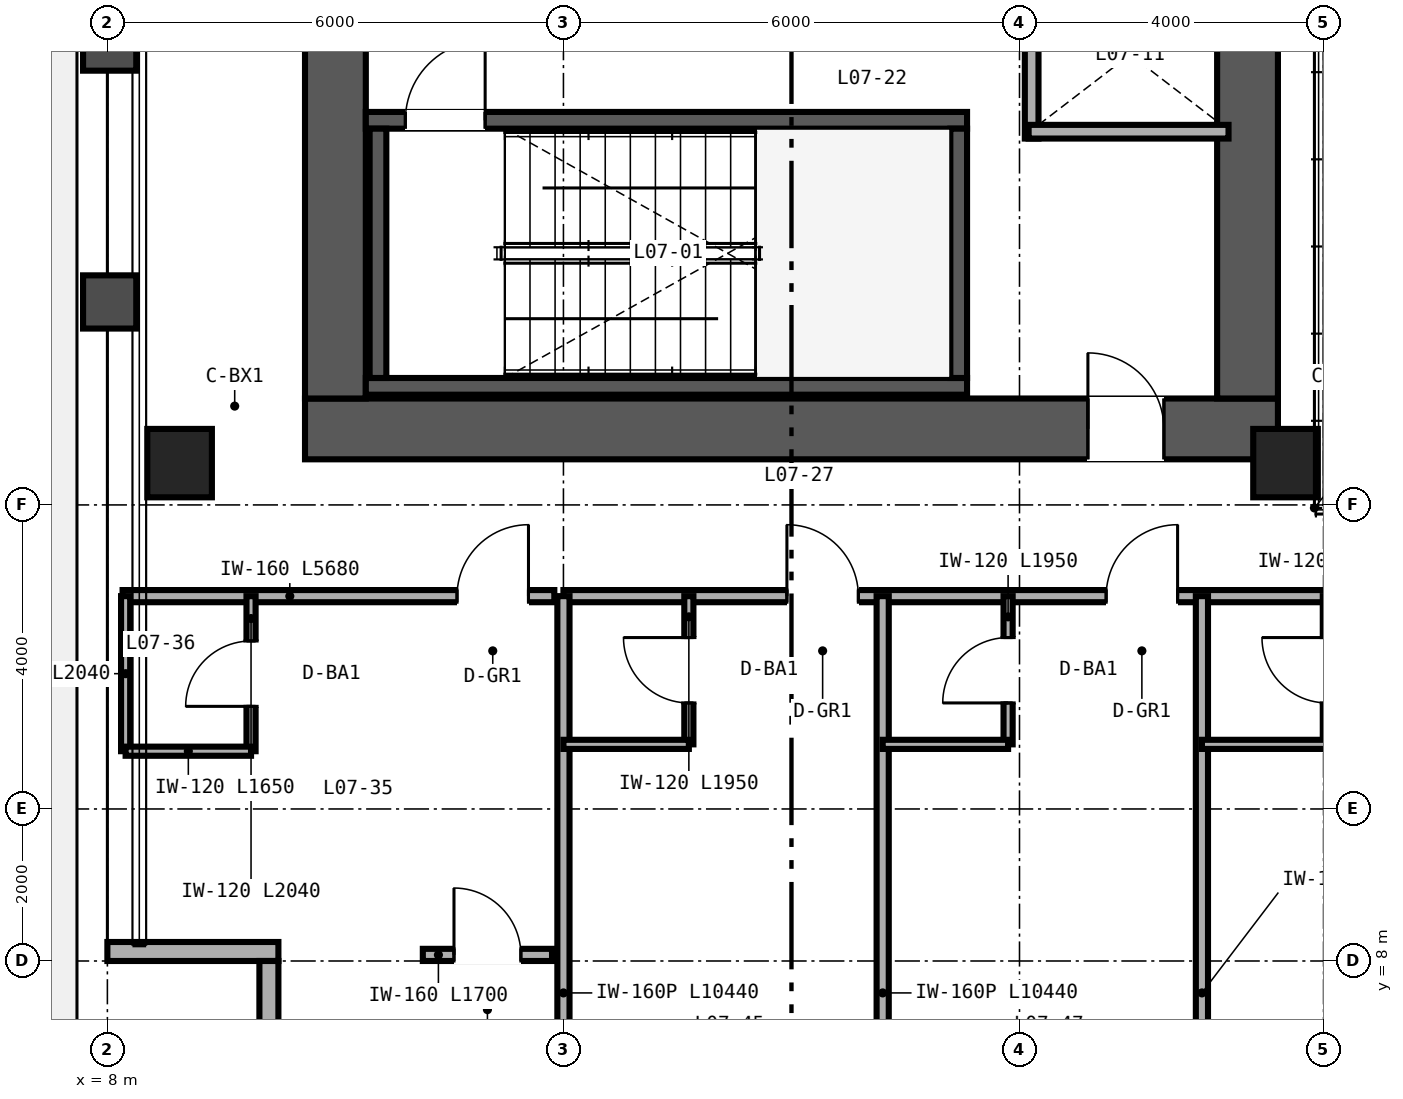
"""IFC4 building model, lengths in metres.
Left out: names, types, materials, properties, quantities, classifications, styles, units other than length and angle.
Written with IfcOpenShell. Run it as: python <this file> out.ifc"""

import sys

from ifc_helpers import new_model, si_unit, direction, frame, frame_2d, origin, origin_2d, place, context, subcontext, project, spatial, rectangle, hollow_rectangle, extrude, source, transform, mapped, element, fill, save


model = new_model("IFC4")
c1 = context("Model", 3, precision=1e-05, world=origin(), true_north=direction((0.0, 1.0)))
c2 = subcontext(c1, "Body", "Model", "MODEL_VIEW")
j1 = project(units=[si_unit("LENGTHUNIT", "METRE"), si_unit("PLANEANGLEUNIT", "RADIAN")], contexts=[c1])
p1 = place(None, origin())
s1 = spatial("IfcSite", under=j1, at=p1, CompositionType="ELEMENT")
p2 = place(p1, origin())
s2 = spatial("IfcBuilding", under=s1, at=p2, CompositionType="ELEMENT")
p3 = place(p2, frame((0.0, 0.0, 34.8)))
s3 = spatial("IfcBuildingStorey", under=s2, at=p3, CompositionType="ELEMENT", Elevation=34.8)
p4 = place(p3, frame((10.6, 15.0, 0.0), z_axis=(0.0, 0.0, 1.0), x_axis=(1.0, 0.0, 0.0)))
e1 = element("IfcWall", 1, at=p4, inside=s3, PredefinedType="SHEAR", context=c2, shape_type="SweptSolid", body=[
    extrude(rectangle(XDim=12.8, YDim=0.8, at=frame_2d((6.4, 0.0))), origin(), (0.0, 0.0, 1.0), 3.35),
])
p5 = place(p4, frame((10.3, 0.0, 0.0)))
e2 = element("IfcOpeningElement", 2, at=p5, cuts=e1, PredefinedType="OPENING", context=c2, shape_type="SweptSolid", body=[
    extrude(rectangle(XDim=1.0, YDim=2.15, at=frame_2d((0.5, 1.075))), frame((0.0, 0.41, 0.0), z_axis=(0.0, -1.0, 0.0), x_axis=(1.0, 0.0, 0.0)), (0.0, 0.0, 1.0), 0.82),
])
for number, where, z_axis, x_axis in (
    (3, (11.0, 15.4, 0.0), (0.0, 0.0, 1.0), (0.0, 1.0, 0.0)),
    (4, (23.0, 15.4, 0.0), (0.0, 0.0, 1.0), (0.0, 1.0, 0.0)),
):
    element("IfcWall", number, at=place(p3, frame(where, z_axis=z_axis, x_axis=x_axis)), inside=s3, PredefinedType="SHEAR", context=c2, shape_type="SweptSolid", body=[
        extrude(rectangle(XDim=21.2, YDim=0.8, at=frame_2d((10.6, 0.0))), origin(), (0.0, 0.0, 1.0), 3.35),
    ])
p6 = place(p3, frame((11.4, 15.56, 0.0), z_axis=(0.0, 0.0, 1.0), x_axis=(1.0, 0.0, 0.0)))
e5 = element("IfcWall", 5, at=p6, inside=s3, PredefinedType="SHEAR", context=c2, shape_type="SweptSolid", body=[
    extrude(rectangle(XDim=7.91, YDim=0.22, at=frame_2d((3.955, 0.0))), origin(), (0.0, 0.0, 1.0), 3.4),
])
p7 = place(p3, frame((11.4, 19.06, 0.0), z_axis=(0.0, 0.0, 1.0), x_axis=(1.0, 0.0, 0.0)))
e6 = element("IfcWall", 6, at=p7, inside=s3, PredefinedType="SHEAR", context=c2, shape_type="SweptSolid", body=[
    extrude(rectangle(XDim=7.91, YDim=0.22, at=frame_2d((3.955, 0.0))), origin(), (0.0, 0.0, 1.0), 3.4),
])
p8 = place(p7, frame((0.52, 0.0, 0.0)))
e7 = element("IfcOpeningElement", 7, at=p8, cuts=e6, PredefinedType="OPENING", context=c2, shape_type="SweptSolid", body=[
    extrude(rectangle(XDim=1.05, YDim=2.15, at=frame_2d((0.525, 1.075))), frame((0.0, 0.12, 0.0), z_axis=(0.0, -1.0, 0.0), x_axis=(1.0, 0.0, 0.0)), (0.0, 0.0, 1.0), 0.24),
])
for number, where, z_axis, x_axis in (
    (8, (11.56, 15.67, 0.0), (0.0, 0.0, 1.0), (0.0, 1.0, 0.0)),
    (9, (19.2, 15.67, 0.0), (0.0, 0.0, 1.0), (0.0, 1.0, 0.0)),
):
    element("IfcWall", number, at=place(p3, frame(where, z_axis=z_axis, x_axis=x_axis)), inside=s3, PredefinedType="SHEAR", context=c2, shape_type="SweptSolid", body=[
        extrude(rectangle(XDim=3.28, YDim=0.22, at=frame_2d((1.64, 0.0))), origin(), (0.0, 0.0, 1.0), 3.4),
    ])
m1 = source(origin(), c2, "Body", "SweptSolid", [
    extrude(hollow_rectangle(XDim=0.85, YDim=0.9, WallThickness=0.04, at=origin_2d()), origin(), (0.0, 0.0, 1.0), 3.35),
])
for number, where, z_axis, x_axis in (
    (10, (8.95, 14.55, 0.0), (0.0, 0.0, 1.0), (1.0, 0.0, 0.0)),
    (11, (23.5, 14.55, 0.0), (0.0, 0.0, 1.0), (1.0, 0.0, 0.0)),
):
    element("IfcColumn", number, at=place(p3, frame(where, z_axis=z_axis, x_axis=x_axis)), inside=s3, PredefinedType="COLUMN", context=c2, shape_type="MappedRepresentation", body=[
        mapped(m1, transform((0.0, 0.0, 0.0), scale=1.0)),
    ])
p9 = place(p3, frame((8.0, 8.125, 0.0), z_axis=(0.0, 0.0, 1.0), x_axis=(1.0, 0.0, 0.0)))
e12 = element("IfcWall", 12, at=p9, inside=s3, PredefinedType="SOLIDWALL", context=c2, shape_type="SweptSolid", body=[
    extrude(rectangle(XDim=2.25, YDim=0.25, at=frame_2d((1.125, 0.0))), origin(), (0.0, 0.0, 1.0), 3.35),
])
p10 = place(p3, frame((10.125, 8.0, 0.0), z_axis=(0.0, 0.0, 1.0), x_axis=(0.0, -1.0, 0.0)))
e13 = element("IfcWall", 13, at=p10, inside=s3, PredefinedType="SOLIDWALL", context=c2, shape_type="SweptSolid", body=[
    extrude(rectangle(XDim=2.0, YDim=0.25, at=frame_2d((1.0, 0.0))), origin(), (0.0, 0.0, 1.0), 3.35),
])
p11 = place(p3, frame((20.16, 18.82, 0.0), z_axis=(0.0, 0.0, 1.0), x_axis=(0.0, 1.0, 0.0)))
e14 = element("IfcWall", 14, at=p11, inside=s3, PredefinedType="SOLIDWALL", context=c2, shape_type="SweptSolid", body=[
    extrude(rectangle(XDim=6.32, YDim=0.18, at=frame_2d((3.16, 0.0))), origin(), (0.0, 0.0, 1.0), 2.36),
])
p12 = place(p3, frame((20.12, 18.91, 0.0), z_axis=(0.0, 0.0, 1.0), x_axis=(1.0, 0.0, 0.0)))
e15 = element("IfcWall", 15, at=p12, inside=s3, PredefinedType="SOLIDWALL", context=c2, shape_type="SweptSolid", body=[
    extrude(rectangle(XDim=2.63, YDim=0.18, at=frame_2d((1.315, 0.0))), origin(), (0.0, 0.0, 1.0), 3.35),
])
p13 = place(p3, frame((8.2, 12.8, 0.0), z_axis=(0.0, 0.0, 1.0), x_axis=(1.0, 0.0, 0.0)))
e16 = element("IfcWall", 16, at=p13, inside=s3, PredefinedType="PARTITIONING", context=c2, shape_type="SweptSolid", body=[
    extrude(rectangle(XDim=5.68, YDim=0.16, at=frame_2d((2.84, 0.0))), origin(), (0.0, 0.0, 1.0), 3.35),
])
p14 = place(p13, frame((4.4, 0.0, 0.0)))
e17 = element("IfcOpeningElement", 17, at=p14, cuts=e16, PredefinedType="OPENING", context=c2, shape_type="SweptSolid", body=[
    extrude(rectangle(XDim=0.94, YDim=2.15, at=frame_2d((0.47, 1.075))), frame((0.0, 0.09, 0.0), z_axis=(0.0, -1.0, 0.0), x_axis=(1.0, 0.0, 0.0)), (0.0, 0.0, 1.0), 0.18),
])
p15 = place(p3, frame((9.89, 10.76, 0.0), z_axis=(0.0, 0.0, 1.0), x_axis=(0.0, 1.0, 0.0)))
e18 = element("IfcWall", 18, at=p15, inside=s3, PredefinedType="PARTITIONING", context=c2, shape_type="SweptSolid", body=[
    extrude(rectangle(XDim=2.04, YDim=0.12, at=frame_2d((1.02, 0.0))), origin(), (0.0, 0.0, 1.0), 3.35),
])
p16 = place(p15, frame((0.59, 0.0, 0.0)))
e19 = element("IfcOpeningElement", 19, at=p16, cuts=e18, PredefinedType="OPENING", context=c2, shape_type="SweptSolid", body=[
    extrude(rectangle(XDim=0.86, YDim=2.1, at=frame_2d((0.43, 1.05))), frame((0.0, 0.07, 0.0), z_axis=(0.0, -1.0, 0.0), x_axis=(1.0, 0.0, 0.0)), (0.0, 0.0, 1.0), 0.14),
])
p17 = place(p3, frame((8.24, 10.76, 0.0), z_axis=(0.0, 0.0, 1.0), x_axis=(0.0, 1.0, 0.0)))
e20 = element("IfcWall", 20, at=p17, inside=s3, PredefinedType="PARTITIONING", context=c2, shape_type="SweptSolid", body=[
    extrude(rectangle(XDim=2.04, YDim=0.12, at=frame_2d((1.02, 0.0))), origin(), (0.0, 0.0, 1.0), 3.35),
])
p18 = place(p3, frame((8.24, 10.76, 0.0), z_axis=(0.0, 0.0, 1.0), x_axis=(1.0, 0.0, 0.0)))
e21 = element("IfcWall", 21, at=p18, inside=s3, PredefinedType="PARTITIONING", context=c2, shape_type="SweptSolid", body=[
    extrude(rectangle(XDim=1.65, YDim=0.12, at=frame_2d((0.825, 0.0))), origin(), (0.0, 0.0, 1.0), 3.35),
])
p19 = place(p3, frame((12.15, 8.08, 0.0), z_axis=(0.0, 0.0, 1.0), x_axis=(1.0, 0.0, 0.0)))
e22 = element("IfcWall", 22, at=p19, inside=s3, PredefinedType="PARTITIONING", context=c2, shape_type="SweptSolid", body=[
    extrude(rectangle(XDim=1.7, YDim=0.16, at=frame_2d((0.85, 0.0))), origin(), (0.0, 0.0, 1.0), 3.35),
])
p20 = place(p19, frame((0.41, 0.0, 0.0)))
e23 = element("IfcOpeningElement", 23, at=p20, cuts=e22, PredefinedType="OPENING", context=c2, shape_type="SweptSolid", body=[
    extrude(rectangle(XDim=0.88, YDim=2.15, at=frame_2d((0.44, 1.075))), frame((0.0, 0.09, 0.0), z_axis=(0.0, -1.0, 0.0), x_axis=(1.0, 0.0, 0.0)), (0.0, 0.0, 1.0), 0.18),
])
p21 = place(p3, frame((14.0, 12.8, 0.0), z_axis=(0.0, 0.0, 1.0), x_axis=(1.0, 0.0, 0.0)))
e24 = element("IfcWall", 24, at=p21, inside=s3, PredefinedType="PARTITIONING", context=c2, shape_type="SweptSolid", body=[
    extrude(rectangle(XDim=36.0, YDim=0.16, at=frame_2d((18.0, 0.0))), origin(), (0.0, 0.0, 1.0), 2.571),
])
p22 = place(p21, frame((2.94, 0.0, 0.0)))
e25 = element("IfcOpeningElement", 25, at=p22, cuts=e24, PredefinedType="OPENING", context=c2, shape_type="SweptSolid", body=[
    extrude(rectangle(XDim=0.94, YDim=2.15, at=frame_2d((0.47, 1.075))), frame((0.0, 0.09, 0.0), z_axis=(0.0, -1.0, 0.0), x_axis=(1.0, 0.0, 0.0)), (0.0, 0.0, 1.0), 0.18),
])
p23 = place(p21, frame((7.14, 0.0, 0.0)))
e26 = element("IfcOpeningElement", 26, at=p23, cuts=e24, PredefinedType="OPENING", context=c2, shape_type="SweptSolid", body=[
    extrude(rectangle(XDim=0.94, YDim=2.15, at=frame_2d((0.47, 1.075))), frame((0.0, 0.09, 0.0), z_axis=(0.0, -1.0, 0.0), x_axis=(1.0, 0.0, 0.0)), (0.0, 0.0, 1.0), 0.18),
])
p24 = place(p21, frame((11.54, 0.0, 0.0)))
e27 = element("IfcOpeningElement", 27, at=p24, cuts=e24, PredefinedType="OPENING", context=c2, shape_type="SweptSolid", body=[
    extrude(rectangle(XDim=0.94, YDim=2.15, at=frame_2d((0.47, 1.075))), frame((0.0, 0.09, 0.0), z_axis=(0.0, -1.0, 0.0), x_axis=(1.0, 0.0, 0.0)), (0.0, 0.0, 1.0), 0.18),
])
p25 = place(p21, frame((15.94, 0.0, 0.0)))
e28 = element("IfcOpeningElement", 28, at=p25, cuts=e24, PredefinedType="OPENING", context=c2, shape_type="SweptSolid", body=[
    extrude(rectangle(XDim=0.94, YDim=2.15, at=frame_2d((0.47, 1.075))), frame((0.0, 0.09, 0.0), z_axis=(0.0, -1.0, 0.0), x_axis=(1.0, 0.0, 0.0)), (0.0, 0.0, 1.0), 0.18),
])
p26 = place(p21, frame((20.54, 0.0, 0.0)))
e29 = element("IfcOpeningElement", 29, at=p26, cuts=e24, PredefinedType="OPENING", context=c2, shape_type="SweptSolid", body=[
    extrude(rectangle(XDim=0.94, YDim=2.15, at=frame_2d((0.47, 1.075))), frame((0.0, 0.09, 0.0), z_axis=(0.0, -1.0, 0.0), x_axis=(1.0, 0.0, 0.0)), (0.0, 0.0, 1.0), 0.18),
])
p27 = place(p21, frame((24.84, 0.0, 0.0)))
e30 = element("IfcOpeningElement", 30, at=p27, cuts=e24, PredefinedType="OPENING", context=c2, shape_type="SweptSolid", body=[
    extrude(rectangle(XDim=0.94, YDim=2.15, at=frame_2d((0.47, 1.075))), frame((0.0, 0.09, 0.0), z_axis=(0.0, -1.0, 0.0), x_axis=(1.0, 0.0, 0.0)), (0.0, 0.0, 1.0), 0.18),
])
p28 = place(p21, frame((29.94, 0.0, 0.0)))
e31 = element("IfcOpeningElement", 31, at=p28, cuts=e24, PredefinedType="OPENING", context=c2, shape_type="SweptSolid", body=[
    extrude(rectangle(XDim=0.94, YDim=2.15, at=frame_2d((0.47, 1.075))), frame((0.0, 0.09, 0.0), z_axis=(0.0, -1.0, 0.0), x_axis=(1.0, 0.0, 0.0)), (0.0, 0.0, 1.0), 0.18),
])
p29 = place(p21, frame((34.74, 0.0, 0.0)))
e32 = element("IfcOpeningElement", 32, at=p29, cuts=e24, PredefinedType="OPENING", context=c2, shape_type="SweptSolid", body=[
    extrude(rectangle(XDim=0.94, YDim=2.15, at=frame_2d((0.47, 1.075))), frame((0.0, 0.09, 0.0), z_axis=(0.0, -1.0, 0.0), x_axis=(1.0, 0.0, 0.0)), (0.0, 0.0, 1.0), 0.18),
])
for number, where, z_axis, x_axis in (
    (33, (14.0, 2.36, 0.0), (0.0, 0.0, 1.0), (0.0, 1.0, 0.0)),
    (34, (18.2, 2.36, 0.0), (0.0, 0.0, 1.0), (0.0, 1.0, 0.0)),
):
    element("IfcWall", number, at=place(p3, frame(where, z_axis=z_axis, x_axis=x_axis)), inside=s3, PredefinedType="PARTITIONING", context=c2, shape_type="SweptSolid", body=[
        extrude(rectangle(XDim=10.44, YDim=0.16, at=frame_2d((5.22, 0.0))), origin(), (0.0, 0.0, 1.0), 2.657),
    ])
p30 = place(p3, frame((15.65, 10.85, 0.0), z_axis=(0.0, 0.0, 1.0), x_axis=(0.0, 1.0, 0.0)))
e35 = element("IfcWall", 35, at=p30, inside=s3, PredefinedType="PARTITIONING", context=c2, shape_type="SweptSolid", body=[
    extrude(rectangle(XDim=1.95, YDim=0.12, at=frame_2d((0.975, 0.0))), origin(), (0.0, 0.0, 1.0), 3.35),
])
p31 = place(p30, frame((0.545, 0.0, 0.0)))
e36 = element("IfcOpeningElement", 36, at=p31, cuts=e35, PredefinedType="OPENING", context=c2, shape_type="SweptSolid", body=[
    extrude(rectangle(XDim=0.86, YDim=2.1, at=frame_2d((0.43, 1.05))), frame((0.0, 0.07, 0.0), z_axis=(0.0, -1.0, 0.0), x_axis=(1.0, 0.0, 0.0)), (0.0, 0.0, 1.0), 0.14),
])
p32 = place(p3, frame((14.0, 10.85, 0.0), z_axis=(0.0, 0.0, 1.0), x_axis=(1.0, 0.0, 0.0)))
e37 = element("IfcWall", 37, at=p32, inside=s3, PredefinedType="PARTITIONING", context=c2, shape_type="SweptSolid", body=[
    extrude(rectangle(XDim=1.65, YDim=0.12, at=frame_2d((0.825, 0.0))), origin(), (0.0, 0.0, 1.0), 3.35),
])
p33 = place(p3, frame((22.4, 2.36, 0.0), z_axis=(0.0, 0.0, 1.0), x_axis=(0.0, 1.0, 0.0)))
e38 = element("IfcWall", 38, at=p33, inside=s3, PredefinedType="PARTITIONING", context=c2, shape_type="SweptSolid", body=[
    extrude(rectangle(XDim=10.44, YDim=0.16, at=frame_2d((5.22, 0.0))), origin(), (0.0, 0.0, 1.0), 2.813),
])
p34 = place(p3, frame((19.85, 10.85, 0.0), z_axis=(0.0, 0.0, 1.0), x_axis=(0.0, 1.0, 0.0)))
e39 = element("IfcWall", 39, at=p34, inside=s3, PredefinedType="PARTITIONING", context=c2, shape_type="SweptSolid", body=[
    extrude(rectangle(XDim=1.95, YDim=0.12, at=frame_2d((0.975, 0.0))), origin(), (0.0, 0.0, 1.0), 3.35),
])
p35 = place(p34, frame((0.545, 0.0, 0.0)))
e40 = element("IfcOpeningElement", 40, at=p35, cuts=e39, PredefinedType="OPENING", context=c2, shape_type="SweptSolid", body=[
    extrude(rectangle(XDim=0.86, YDim=2.1, at=frame_2d((0.43, 1.05))), frame((0.0, 0.07, 0.0), z_axis=(0.0, -1.0, 0.0), x_axis=(1.0, 0.0, 0.0)), (0.0, 0.0, 1.0), 0.14),
])
p36 = place(p3, frame((18.2, 10.85, 0.0), z_axis=(0.0, 0.0, 1.0), x_axis=(1.0, 0.0, 0.0)))
e41 = element("IfcWall", 41, at=p36, inside=s3, PredefinedType="PARTITIONING", context=c2, shape_type="SweptSolid", body=[
    extrude(rectangle(XDim=1.65, YDim=0.12, at=frame_2d((0.825, 0.0))), origin(), (0.0, 0.0, 1.0), 3.35),
])
p37 = place(p3, frame((24.05, 10.85, 0.0), z_axis=(0.0, 0.0, 1.0), x_axis=(0.0, 1.0, 0.0)))
e42 = element("IfcWall", 42, at=p37, inside=s3, PredefinedType="PARTITIONING", context=c2, shape_type="SweptSolid", body=[
    extrude(rectangle(XDim=1.95, YDim=0.12, at=frame_2d((0.975, 0.0))), origin(), (0.0, 0.0, 1.0), 3.35),
])
p38 = place(p37, frame((0.545, 0.0, 0.0)))
e43 = element("IfcOpeningElement", 43, at=p38, cuts=e42, PredefinedType="OPENING", context=c2, shape_type="SweptSolid", body=[
    extrude(rectangle(XDim=0.86, YDim=2.1, at=frame_2d((0.43, 1.05))), frame((0.0, 0.07, 0.0), z_axis=(0.0, -1.0, 0.0), x_axis=(1.0, 0.0, 0.0)), (0.0, 0.0, 1.0), 0.14),
])
p39 = place(p3, frame((22.4, 10.85, 0.0), z_axis=(0.0, 0.0, 1.0), x_axis=(1.0, 0.0, 0.0)))
e44 = element("IfcWall", 44, at=p39, inside=s3, PredefinedType="PARTITIONING", context=c2, shape_type="SweptSolid", body=[
    extrude(rectangle(XDim=1.65, YDim=0.12, at=frame_2d((0.825, 0.0))), origin(), (0.0, 0.0, 1.0), 2.571),
])
m2 = source(origin(), c2, "Body", "SweptSolid", [
    extrude(rectangle(XDim=1.05, YDim=2.15, at=frame_2d((0.525, 1.075))), frame((0.0, 0.025, 0.0), z_axis=(0.0, -1.0, 0.0), x_axis=(1.0, 0.0, 0.0)), (0.0, 0.0, 1.0), 0.05),
])
p40 = place(p8, origin())
e45 = element("IfcDoor", 45, at=p40, inside=s3, OperationType="SINGLE_SWING_RIGHT", PredefinedType="DOOR", context=c2, shape_type="MappedRepresentation", body=[
    mapped(m2, transform((0.0, 0.0, 0.0), scale=1.0)),
])
fill(e7, e45)
m3 = source(origin(), c2, "Body", "SweptSolid", [
    extrude(rectangle(XDim=1.0, YDim=2.15, at=frame_2d((0.5, 1.075))), frame((0.0, 0.025, 0.0), z_axis=(0.0, -1.0, 0.0), x_axis=(1.0, 0.0, 0.0)), (0.0, 0.0, 1.0), 0.05),
])
p41 = place(p5, origin())
e46 = element("IfcDoor", 46, at=p41, inside=s3, OperationType="SINGLE_SWING_LEFT", PredefinedType="DOOR", context=c2, shape_type="MappedRepresentation", body=[
    mapped(m3, transform((0.0, 0.0, 0.0), scale=1.0)),
])
fill(e2, e46)
m4 = source(origin(), c2, "Body", "SweptSolid", [
    extrude(rectangle(XDim=0.86, YDim=2.1, at=frame_2d((0.43, 1.05))), frame((0.0, 0.025, 0.0), z_axis=(0.0, -1.0, 0.0), x_axis=(1.0, 0.0, 0.0)), (0.0, 0.0, 1.0), 0.05),
])
p42 = place(p16, origin())
e47 = element("IfcDoor", 47, at=p42, inside=s3, OperationType="SINGLE_SWING_LEFT", PredefinedType="DOOR", context=c2, shape_type="MappedRepresentation", body=[
    mapped(m4, transform((0.0, 0.0, 0.0), scale=1.0)),
])
fill(e19, e47)
m5 = source(origin(), c2, "Body", "SweptSolid", [
    extrude(rectangle(XDim=0.94, YDim=2.15, at=frame_2d((0.47, 1.075))), frame((0.0, 0.025, 0.0), z_axis=(0.0, -1.0, 0.0), x_axis=(1.0, 0.0, 0.0)), (0.0, 0.0, 1.0), 0.05),
])
p43 = place(p14, origin())
e48 = element("IfcDoor", 48, at=p43, inside=s3, OperationType="SINGLE_SWING_RIGHT", PredefinedType="DOOR", context=c2, shape_type="MappedRepresentation", body=[
    mapped(m5, transform((0.0, 0.0, 0.0), scale=1.0)),
])
fill(e17, e48)
m6 = source(origin(), c2, "Body", "SweptSolid", [
    extrude(rectangle(XDim=0.88, YDim=2.15, at=frame_2d((0.44, 1.075))), frame((0.0, 0.025, 0.0), z_axis=(0.0, -1.0, 0.0), x_axis=(1.0, 0.0, 0.0)), (0.0, 0.0, 1.0), 0.05),
])
p44 = place(p20, origin())
e49 = element("IfcDoor", 49, at=p44, inside=s3, OperationType="SINGLE_SWING_LEFT", PredefinedType="DOOR", context=c2, shape_type="MappedRepresentation", body=[
    mapped(m6, transform((0.0, 0.0, 0.0), scale=1.0)),
])
fill(e23, e49)
p45 = place(p31, origin())
e50 = element("IfcDoor", 50, at=p45, inside=s3, OperationType="SINGLE_SWING_RIGHT", PredefinedType="DOOR", context=c2, shape_type="MappedRepresentation", body=[
    mapped(m4, transform((0.0, 0.0, 0.0), scale=1.0)),
])
fill(e36, e50)
p46 = place(p35, origin())
e51 = element("IfcDoor", 51, at=p46, inside=s3, OperationType="SINGLE_SWING_LEFT", PredefinedType="DOOR", context=c2, shape_type="MappedRepresentation", body=[
    mapped(m4, transform((0.0, 0.0, 0.0), scale=1.0)),
])
fill(e40, e51)
p47 = place(p22, origin())
e52 = element("IfcDoor", 52, at=p47, inside=s3, OperationType="SINGLE_SWING_LEFT", PredefinedType="DOOR", context=c2, shape_type="MappedRepresentation", body=[
    mapped(m5, transform((0.0, 0.0, 0.0), scale=1.0)),
])
fill(e25, e52)
p48 = place(p23, origin())
e53 = element("IfcDoor", 53, at=p48, inside=s3, OperationType="SINGLE_SWING_RIGHT", PredefinedType="DOOR", context=c2, shape_type="MappedRepresentation", body=[
    mapped(m5, transform((0.0, 0.0, 0.0), scale=1.0)),
])
fill(e26, e53)
save(model, sys.argv[1])
